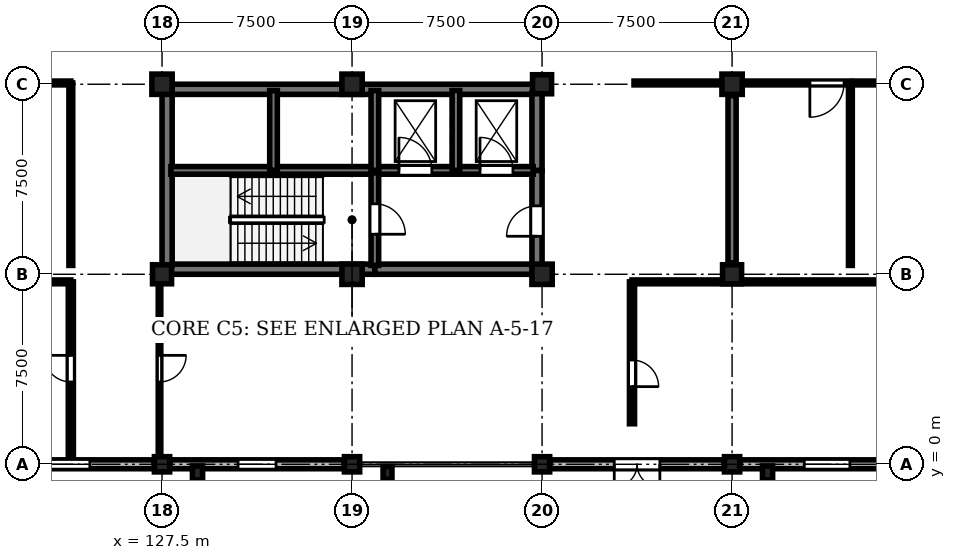
"""IFC4 building model, lengths in metres.
Left out: names, types, materials, properties, quantities, classifications, styles, units other than length and angle.
Written with IfcOpenShell. Run it as: python <this file> out.ifc"""

import sys

from ifc_helpers import new_model, si_unit, direction, frame, frame_2d, origin, origin_2d, place, context, subcontext, project, spatial, rectangle, circle, extrude, element, fill, save


model = new_model("IFC4")
c1 = context("Model", 3, precision=1e-05, world=origin(), true_north=direction((0.0, 1.0)))
c2 = subcontext(c1, "Body", "Model", "MODEL_VIEW")
j1 = project(units=[si_unit("LENGTHUNIT", "METRE"), si_unit("PLANEANGLEUNIT", "RADIAN")], contexts=[c1])
p1 = place(None, origin())
s1 = spatial("IfcSite", under=j1, at=p1, CompositionType="ELEMENT")
p2 = place(p1, origin())
s2 = spatial("IfcBuilding", under=s1, at=p2, CompositionType="ELEMENT")
p3 = place(p2, origin())
s3 = spatial("IfcBuildingStorey", under=s2, at=p3, CompositionType="ELEMENT", Elevation=0.0)
p4 = place(p3, frame((127.5, 0.0, 0.0), z_axis=(0.0, 0.0, 1.0), x_axis=(1.0, 0.0, 0.0)))
e1 = element("IfcColumn", 1, at=p4, inside=s3, PredefinedType="COLUMN", context=c2, shape_type="SweptSolid", body=[
    extrude(rectangle(XDim=0.6, YDim=0.6, at=origin_2d()), origin(), (0.0, 0.0, 1.0), 4.8),
])
p5 = place(p3, frame((127.5, 7.5, 0.0), z_axis=(0.0, 0.0, 1.0), x_axis=(1.0, 0.0, 0.0)))
e2 = element("IfcColumn", 2, at=p5, inside=s3, PredefinedType="COLUMN", context=c2, shape_type="SweptSolid", body=[
    extrude(circle(Radius=0.375, at=origin_2d()), origin(), (0.0, 0.0, 1.0), 4.8),
])
p6 = place(p3, frame((127.5, 15.0, 0.0), z_axis=(0.0, 0.0, 1.0), x_axis=(1.0, 0.0, 0.0)))
e3 = element("IfcColumn", 3, at=p6, inside=s3, PredefinedType="COLUMN", context=c2, shape_type="SweptSolid", body=[
    extrude(rectangle(XDim=0.8, YDim=0.8, at=origin_2d()), origin(), (0.0, 0.0, 1.0), 4.8),
])
p7 = place(p3, frame((135.0, 0.0, 0.0), z_axis=(0.0, 0.0, 1.0), x_axis=(1.0, 0.0, 0.0)))
e4 = element("IfcColumn", 4, at=p7, inside=s3, PredefinedType="COLUMN", context=c2, shape_type="SweptSolid", body=[
    extrude(circle(Radius=0.3, at=origin_2d()), origin(), (0.0, 0.0, 1.0), 4.8),
])
for number, where, z_axis, x_axis in (
    (5, (135.0, 7.5, 0.0), (0.0, 0.0, 1.0), (1.0, 0.0, 0.0)),
    (6, (135.0, 15.0, 0.0), (0.0, 0.0, 1.0), (1.0, 0.0, 0.0)),
):
    element("IfcColumn", number, at=place(p3, frame(where, z_axis=z_axis, x_axis=x_axis)), inside=s3, PredefinedType="COLUMN", context=c2, shape_type="SweptSolid", body=[
        extrude(rectangle(XDim=0.8, YDim=0.8, at=origin_2d()), origin(), (0.0, 0.0, 1.0), 4.8),
    ])
p8 = place(p3, frame((142.5, 0.0, 0.0), z_axis=(0.0, 0.0, 1.0), x_axis=(1.0, 0.0, 0.0)))
e7 = element("IfcColumn", 7, at=p8, inside=s3, PredefinedType="COLUMN", context=c2, shape_type="SweptSolid", body=[
    extrude(rectangle(XDim=0.6, YDim=0.6, at=origin_2d()), origin(), (0.0, 0.0, 1.0), 4.8),
])
p9 = place(p3, frame((142.5, 7.5, 0.0), z_axis=(0.0, 0.0, 1.0), x_axis=(1.0, 0.0, 0.0)))
e8 = element("IfcColumn", 8, at=p9, inside=s3, PredefinedType="COLUMN", context=c2, shape_type="SweptSolid", body=[
    extrude(rectangle(XDim=0.8, YDim=0.8, at=origin_2d()), origin(), (0.0, 0.0, 1.0), 4.8),
])
p10 = place(p3, frame((142.5, 15.0, 0.0), z_axis=(0.0, 0.0, 1.0), x_axis=(1.0, 0.0, 0.0)))
e9 = element("IfcColumn", 9, at=p10, inside=s3, PredefinedType="COLUMN", context=c2, shape_type="SweptSolid", body=[
    extrude(circle(Radius=0.375, at=origin_2d()), origin(), (0.0, 0.0, 1.0), 4.8),
])
p11 = place(p3, frame((150.0, 0.0, 0.0), z_axis=(0.0, 0.0, 1.0), x_axis=(1.0, 0.0, 0.0)))
e10 = element("IfcColumn", 10, at=p11, inside=s3, PredefinedType="COLUMN", context=c2, shape_type="SweptSolid", body=[
    extrude(rectangle(XDim=0.6, YDim=0.6, at=origin_2d()), origin(), (0.0, 0.0, 1.0), 4.8),
])
p12 = place(p3, frame((150.0, 7.5, 0.0), z_axis=(0.0, 0.0, 1.0), x_axis=(1.0, 0.0, 0.0)))
e11 = element("IfcColumn", 11, at=p12, inside=s3, PredefinedType="COLUMN", context=c2, shape_type="SweptSolid", body=[
    extrude(circle(Radius=0.375, at=origin_2d()), origin(), (0.0, 0.0, 1.0), 4.8),
])
p13 = place(p3, frame((150.0, 15.0, 0.0), z_axis=(0.0, 0.0, 1.0), x_axis=(1.0, 0.0, 0.0)))
e12 = element("IfcColumn", 12, at=p13, inside=s3, PredefinedType="COLUMN", context=c2, shape_type="SweptSolid", body=[
    extrude(rectangle(XDim=0.8, YDim=0.8, at=origin_2d()), origin(), (0.0, 0.0, 1.0), 4.8),
])
p14 = place(p3, frame((128.9, -0.34, 0.0), z_axis=(0.0, 0.0, 1.0), x_axis=(1.0, 0.0, 0.0)))
e13 = element("IfcColumn", 13, at=p14, inside=s3, PredefinedType="PILASTER", context=c2, shape_type="SweptSolid", body=[
    extrude(rectangle(XDim=0.4, YDim=0.55, at=origin_2d()), origin(), (0.0, 0.0, 1.0), 4.1),
])
p15 = place(p3, frame((136.4, -0.34, 0.0), z_axis=(0.0, 0.0, 1.0), x_axis=(1.0, 0.0, 0.0)))
e14 = element("IfcColumn", 14, at=p15, inside=s3, PredefinedType="PILASTER", context=c2, shape_type="SweptSolid", body=[
    extrude(rectangle(XDim=0.35, YDim=0.5, at=origin_2d()), origin(), (0.0, 0.0, 1.0), 4.1),
])
p16 = place(p3, frame((151.4, -0.34, 0.0), z_axis=(0.0, 0.0, 1.0), x_axis=(1.0, 0.0, 0.0)))
e15 = element("IfcColumn", 15, at=p16, inside=s3, PredefinedType="PILASTER", context=c2, shape_type="SweptSolid", body=[
    extrude(rectangle(XDim=0.4, YDim=0.55, at=origin_2d()), origin(), (0.0, 0.0, 1.0), 4.1),
])
p17 = place(p3, frame((150.0, 7.95, 0.0), z_axis=(0.0, 0.0, 1.0), x_axis=(0.0, 1.0, 0.0)))
e16 = element("IfcWall", 16, at=p17, inside=s3, PredefinedType="SHEAR", context=c2, shape_type="SweptSolid", body=[
    extrude(rectangle(XDim=6.6, YDim=0.32, at=frame_2d((3.3, 0.0))), origin(), (0.0, 0.0, 1.0), 3.95),
])
p18 = place(p3, frame((127.19, 0.0, 0.0), z_axis=(0.0, 0.0, 1.0), x_axis=(-1.0, 0.0, 0.0)))
e17 = element("IfcWall", 17, at=p18, inside=s3, PredefinedType="STANDARD", context=c2, shape_type="SweptSolid", body=[
    extrude(rectangle(XDim=6.88, YDim=0.35, at=frame_2d((3.44, 0.0))), origin(), (0.0, 0.0, 1.0), 3.95),
])
p19 = place(p18, frame((2.54, 0.0, 0.9)))
e18 = element("IfcOpeningElement", 18, at=p19, cuts=e17, PredefinedType="OPENING", context=c2, shape_type="SweptSolid", body=[
    extrude(rectangle(XDim=1.8, YDim=2.4, at=frame_2d((0.9, 1.2))), frame((0.0, 0.185, 0.0), z_axis=(0.0, -1.0, 0.0), x_axis=(1.0, 0.0, 0.0)), (0.0, 0.0, 1.0), 0.37),
])
p20 = place(p3, frame((134.69, 0.0, 0.0), z_axis=(0.0, 0.0, 1.0), x_axis=(-1.0, 0.0, 0.0)))
e19 = element("IfcWall", 19, at=p20, inside=s3, PredefinedType="STANDARD", context=c2, shape_type="SweptSolid", body=[
    extrude(rectangle(XDim=6.88, YDim=0.35, at=frame_2d((3.44, 0.0))), origin(), (0.0, 0.0, 1.0), 3.95),
])
p21 = place(p20, frame((2.69, 0.0, 0.9)))
e20 = element("IfcOpeningElement", 20, at=p21, cuts=e19, PredefinedType="OPENING", context=c2, shape_type="SweptSolid", body=[
    extrude(rectangle(XDim=1.5, YDim=2.4, at=frame_2d((0.75, 1.2))), frame((0.0, 0.185, 0.0), z_axis=(0.0, -1.0, 0.0), x_axis=(1.0, 0.0, 0.0)), (0.0, 0.0, 1.0), 0.37),
])
p22 = place(p3, frame((149.69, 0.0, 0.0), z_axis=(0.0, 0.0, 1.0), x_axis=(-1.0, 0.0, 0.0)))
e21 = element("IfcWall", 21, at=p22, inside=s3, PredefinedType="STANDARD", context=c2, shape_type="SweptSolid", body=[
    extrude(rectangle(XDim=6.88, YDim=0.35, at=frame_2d((3.44, 0.0))), origin(), (0.0, 0.0, 1.0), 3.95),
])
p23 = place(p22, frame((2.54, 0.0, 0.0)))
e22 = element("IfcOpeningElement", 22, at=p23, cuts=e21, PredefinedType="OPENING", context=c2, shape_type="SweptSolid", body=[
    extrude(rectangle(XDim=1.8, YDim=2.5, at=frame_2d((0.9, 1.25))), frame((0.0, 0.185, 0.0), z_axis=(0.0, -1.0, 0.0), x_axis=(1.0, 0.0, 0.0)), (0.0, 0.0, 1.0), 0.37),
])
p24 = place(p3, frame((157.19, 0.0, 0.0), z_axis=(0.0, 0.0, 1.0), x_axis=(-1.0, 0.0, 0.0)))
e23 = element("IfcWall", 23, at=p24, inside=s3, PredefinedType="STANDARD", context=c2, shape_type="SweptSolid", body=[
    extrude(rectangle(XDim=6.88, YDim=0.35, at=frame_2d((3.44, 0.0))), origin(), (0.0, 0.0, 1.0), 3.95),
])
p25 = place(p24, frame((2.54, 0.0, 0.9)))
e24 = element("IfcOpeningElement", 24, at=p25, cuts=e23, PredefinedType="OPENING", context=c2, shape_type="SweptSolid", body=[
    extrude(rectangle(XDim=1.8, YDim=2.1, at=frame_2d((0.9, 1.05))), frame((0.0, 0.185, 0.0), z_axis=(0.0, -1.0, 0.0), x_axis=(1.0, 0.0, 0.0)), (0.0, 0.0, 1.0), 0.37),
])
p26 = place(p3, frame((127.85, 7.7, 0.0), z_axis=(0.0, 0.0, 1.0), x_axis=(1.0, 0.0, 0.0)))
e25 = element("IfcWall", 25, at=p26, inside=s3, PredefinedType="SHEAR", context=c2, shape_type="SweptSolid", body=[
    extrude(rectangle(XDim=8.05, YDim=0.4, at=frame_2d((4.025, 0.0))), origin(), (0.0, 0.0, 1.0), 4.5),
])
p27 = place(p3, frame((135.9, 7.7, 0.0), z_axis=(0.0, 0.0, 1.0), x_axis=(1.0, 0.0, 0.0)))
e26 = element("IfcWall", 26, at=p27, inside=s3, PredefinedType="SHEAR", context=c2, shape_type="SweptSolid", body=[
    extrude(rectangle(XDim=6.25, YDim=0.4, at=frame_2d((3.125, 0.0))), origin(), (0.0, 0.0, 1.0), 4.5),
])
p28 = place(p3, frame((127.85, 14.8, 0.0), z_axis=(0.0, 0.0, 1.0), x_axis=(1.0, 0.0, 0.0)))
e27 = element("IfcWall", 27, at=p28, inside=s3, PredefinedType="SHEAR", context=c2, shape_type="SweptSolid", body=[
    extrude(rectangle(XDim=14.3, YDim=0.4, at=frame_2d((7.15, 0.0))), origin(), (0.0, 0.0, 1.0), 4.5),
])
p29 = place(p3, frame((127.7, 7.85, 0.0), z_axis=(0.0, 0.0, 1.0), x_axis=(0.0, 1.0, 0.0)))
e28 = element("IfcWall", 28, at=p29, inside=s3, PredefinedType="SHEAR", context=c2, shape_type="SweptSolid", body=[
    extrude(rectangle(XDim=6.8, YDim=0.4, at=frame_2d((3.4, 0.0))), origin(), (0.0, 0.0, 1.0), 4.5),
])
p30 = place(p3, frame((142.3, 7.85, 0.0), z_axis=(0.0, 0.0, 1.0), x_axis=(0.0, 1.0, 0.0)))
e29 = element("IfcWall", 29, at=p30, inside=s3, PredefinedType="SHEAR", context=c2, shape_type="SweptSolid", body=[
    extrude(rectangle(XDim=3.75, YDim=0.4, at=frame_2d((1.875, 0.0))), origin(), (0.0, 0.0, 1.0), 4.5),
])
p31 = place(p30, frame((1.15, 0.0, 0.0)))
e30 = element("IfcOpeningElement", 30, at=p31, cuts=e29, PredefinedType="OPENING", context=c2, shape_type="SweptSolid", body=[
    extrude(rectangle(XDim=1.2, YDim=2.25, at=frame_2d((0.6, 1.125))), frame((0.0, 0.21, 0.0), z_axis=(0.0, -1.0, 0.0), x_axis=(1.0, 0.0, 0.0)), (0.0, 0.0, 1.0), 0.42),
])
p32 = place(p3, frame((142.3, 11.6, 0.0), z_axis=(0.0, 0.0, 1.0), x_axis=(0.0, 1.0, 0.0)))
e31 = element("IfcWall", 31, at=p32, inside=s3, PredefinedType="SHEAR", context=c2, shape_type="SweptSolid", body=[
    extrude(rectangle(XDim=3.05, YDim=0.4, at=frame_2d((1.525, 0.0))), origin(), (0.0, 0.0, 1.0), 4.5),
])
p33 = place(p3, frame((127.85, 11.6, 0.0), z_axis=(0.0, 0.0, 1.0), x_axis=(1.0, 0.0, 0.0)))
e32 = element("IfcWall", 32, at=p33, inside=s3, PredefinedType="SHEAR", context=c2, shape_type="SweptSolid", body=[
    extrude(rectangle(XDim=8.05, YDim=0.3, at=frame_2d((4.025, 0.0))), origin(), (0.0, 0.0, 1.0), 4.5),
])
p34 = place(p3, frame((135.9, 11.6, 0.0), z_axis=(0.0, 0.0, 1.0), x_axis=(1.0, 0.0, 0.0)))
e33 = element("IfcWall", 33, at=p34, inside=s3, PredefinedType="SHEAR", context=c2, shape_type="SweptSolid", body=[
    extrude(rectangle(XDim=6.25, YDim=0.3, at=frame_2d((3.125, 0.0))), origin(), (0.0, 0.0, 1.0), 4.5),
])
p35 = place(p34, frame((0.95, 0.0, 0.0)))
e34 = element("IfcOpeningElement", 34, at=p35, cuts=e33, PredefinedType="OPENING", context=c2, shape_type="SweptSolid", body=[
    extrude(rectangle(XDim=1.3, YDim=2.2, at=frame_2d((0.65, 1.1))), frame((0.0, 0.16, 0.0), z_axis=(0.0, -1.0, 0.0), x_axis=(1.0, 0.0, 0.0)), (0.0, 0.0, 1.0), 0.32),
])
p36 = place(p34, frame((4.15, 0.0, 0.0)))
e35 = element("IfcOpeningElement", 35, at=p36, cuts=e33, PredefinedType="OPENING", context=c2, shape_type="SweptSolid", body=[
    extrude(rectangle(XDim=1.3, YDim=2.2, at=frame_2d((0.65, 1.1))), frame((0.0, 0.16, 0.0), z_axis=(0.0, -1.0, 0.0), x_axis=(1.0, 0.0, 0.0)), (0.0, 0.0, 1.0), 0.32),
])
p37 = place(p3, frame((135.9, 11.5, 0.0), z_axis=(0.0, 0.0, 1.0), x_axis=(0.0, -1.0, 0.0)))
e36 = element("IfcWall", 36, at=p37, inside=s3, PredefinedType="SHEAR", context=c2, shape_type="SweptSolid", body=[
    extrude(rectangle(XDim=3.65, YDim=0.3, at=frame_2d((1.825, 0.0))), origin(), (0.0, 0.0, 1.0), 4.5),
])
p38 = place(p37, frame((1.22, 0.0, 0.0)))
e37 = element("IfcOpeningElement", 37, at=p38, cuts=e36, PredefinedType="OPENING", context=c2, shape_type="SweptSolid", body=[
    extrude(rectangle(XDim=1.2, YDim=2.25, at=frame_2d((0.6, 1.125))), frame((0.0, 0.16, 0.0), z_axis=(0.0, -1.0, 0.0), x_axis=(1.0, 0.0, 0.0)), (0.0, 0.0, 1.0), 0.32),
])
for number, where, z_axis, x_axis in (
    (38, (131.9, 11.6, 0.0), (0.0, 0.0, 1.0), (0.0, 1.0, 0.0)),
    (39, (135.9, 11.6, 0.0), (0.0, 0.0, 1.0), (0.0, 1.0, 0.0)),
    (40, (139.1, 11.6, 0.0), (0.0, 0.0, 1.0), (0.0, 1.0, 0.0)),
):
    element("IfcWall", number, at=place(p3, frame(where, z_axis=z_axis, x_axis=x_axis)), inside=s3, PredefinedType="SHEAR", context=c2, shape_type="SweptSolid", body=[
        extrude(rectangle(XDim=3.15, YDim=0.3, at=frame_2d((1.575, 0.0))), origin(), (0.0, 0.0, 1.0), 4.5),
    ])
p39 = place(p3, frame((123.9, 0.35, 0.0), z_axis=(0.0, 0.0, 1.0), x_axis=(0.0, 1.0, 0.0)))
e41 = element("IfcWall", 41, at=p39, inside=s3, PredefinedType="STANDARD", context=c2, shape_type="SweptSolid", body=[
    extrude(rectangle(XDim=6.85, YDim=0.2, at=frame_2d((3.425, 0.0))), origin(), (0.0, 0.0, 1.0), 4.485),
])
p40 = place(p39, frame((2.9, 0.0, 0.0)))
e42 = element("IfcOpeningElement", 42, at=p40, cuts=e41, PredefinedType="OPENING", context=c2, shape_type="SweptSolid", body=[
    extrude(rectangle(XDim=1.05, YDim=2.2, at=frame_2d((0.525, 1.1))), frame((0.0, 0.11, 0.0), z_axis=(0.0, -1.0, 0.0), x_axis=(1.0, 0.0, 0.0)), (0.0, 0.0, 1.0), 0.22),
])
p41 = place(p3, frame((127.4, 7.2, 0.0), z_axis=(0.0, 0.0, 1.0), x_axis=(0.0, -1.0, 0.0)))
e43 = element("IfcWall", 43, at=p41, inside=s3, PredefinedType="PARTITIONING", context=c2, shape_type="SweptSolid", body=[
    extrude(rectangle(XDim=6.85, YDim=0.1, at=frame_2d((3.425, 0.0))), origin(), (0.0, 0.0, 1.0), 3.985),
])
p42 = place(p41, frame((2.9, 0.0, 0.0)))
e44 = element("IfcOpeningElement", 44, at=p42, cuts=e43, PredefinedType="OPENING", context=c2, shape_type="SweptSolid", body=[
    extrude(rectangle(XDim=1.05, YDim=2.2, at=frame_2d((0.525, 1.1))), frame((0.0, 0.06, 0.0), z_axis=(0.0, -1.0, 0.0), x_axis=(1.0, 0.0, 0.0)), (0.0, 0.0, 1.0), 0.12),
])
p43 = place(p3, frame((146.05, 7.2, 0.0), z_axis=(0.0, 0.0, 1.0), x_axis=(0.0, -1.0, 0.0)))
e45 = element("IfcWall", 45, at=p43, inside=s3, PredefinedType="STANDARD", context=c2, shape_type="SweptSolid", body=[
    extrude(rectangle(XDim=5.6, YDim=0.2, at=frame_2d((2.8, 0.0))), origin(), (0.0, 0.0, 1.0), 4.485),
])
p44 = place(p43, frame((3.085, 0.0, 0.0)))
e46 = element("IfcOpeningElement", 46, at=p44, cuts=e45, PredefinedType="OPENING", context=c2, shape_type="SweptSolid", body=[
    extrude(rectangle(XDim=1.05, YDim=2.2, at=frame_2d((0.525, 1.1))), frame((0.0, 0.11, 0.0), z_axis=(0.0, -1.0, 0.0), x_axis=(1.0, 0.0, 0.0)), (0.0, 0.0, 1.0), 0.22),
])
p45 = place(p3, frame((123.9, 15.05, 0.0), z_axis=(0.0, 0.0, 1.0), x_axis=(-1.0, 0.0, 0.0)))
e47 = element("IfcWall", 47, at=p45, inside=s3, PredefinedType="PARTITIONING", context=c2, shape_type="SweptSolid", body=[
    extrude(rectangle(XDim=11.05, YDim=0.15, at=frame_2d((5.525, 0.0))), origin(), (0.0, 0.0, 1.0), 3.835),
])
p46 = place(p45, frame((6.76, 0.0, 0.0)))
e48 = element("IfcOpeningElement", 48, at=p46, cuts=e47, PredefinedType="OPENING", context=c2, shape_type="SweptSolid", body=[
    extrude(rectangle(XDim=1.25, YDim=2.2, at=frame_2d((0.625, 1.1))), frame((0.0, 0.085, 0.0), z_axis=(0.0, -1.0, 0.0), x_axis=(1.0, 0.0, 0.0)), (0.0, 0.0, 1.0), 0.17),
])
p47 = place(p3, frame((154.67, 15.05, 0.0), z_axis=(0.0, 0.0, 1.0), x_axis=(-1.0, 0.0, 0.0)))
e49 = element("IfcWall", 49, at=p47, inside=s3, PredefinedType="PARTITIONING", context=c2, shape_type="SweptSolid", body=[
    extrude(rectangle(XDim=8.54, YDim=0.15, at=frame_2d((4.27, 0.0))), origin(), (0.0, 0.0, 1.0), 3.835),
])
p48 = place(p47, frame((0.25, 0.0, 0.0)))
e50 = element("IfcOpeningElement", 50, at=p48, cuts=e49, PredefinedType="OPENING", context=c2, shape_type="SweptSolid", body=[
    extrude(rectangle(XDim=1.35, YDim=2.25, at=frame_2d((0.675, 1.125))), frame((0.0, 0.085, 0.0), z_axis=(0.0, -1.0, 0.0), x_axis=(1.0, 0.0, 0.0)), (0.0, 0.0, 1.0), 0.17),
])
p49 = place(p3, frame((163.37, 15.05, 0.0), z_axis=(0.0, 0.0, 1.0), x_axis=(-1.0, 0.0, 0.0)))
e51 = element("IfcWall", 51, at=p49, inside=s3, PredefinedType="PARTITIONING", context=c2, shape_type="SweptSolid", body=[
    extrude(rectangle(XDim=8.54, YDim=0.15, at=frame_2d((4.27, 0.0))), origin(), (0.0, 0.0, 1.0), 3.835),
])
p50 = place(p49, frame((1.588, 0.0, 0.0)))
e52 = element("IfcOpeningElement", 52, at=p50, cuts=e51, PredefinedType="OPENING", context=c2, shape_type="SweptSolid", body=[
    extrude(rectangle(XDim=1.35, YDim=2.25, at=frame_2d((0.675, 1.125))), frame((0.0, 0.085, 0.0), z_axis=(0.0, -1.0, 0.0), x_axis=(1.0, 0.0, 0.0)), (0.0, 0.0, 1.0), 0.17),
])
p51 = place(p3, frame((112.85, 7.2, 0.0), z_axis=(0.0, 0.0, 1.0), x_axis=(1.0, 0.0, 0.0)))
e53 = element("IfcWall", 53, at=p51, inside=s3, PredefinedType="PARTITIONING", context=c2, shape_type="SweptSolid", body=[
    extrude(rectangle(XDim=11.05, YDim=0.15, at=frame_2d((5.525, 0.0))), origin(), (0.0, 0.0, 1.0), 3.835),
])
p52 = place(p3, frame((146.05, 7.2, 0.0), z_axis=(0.0, 0.0, 1.0), x_axis=(1.0, 0.0, 0.0)))
e54 = element("IfcWall", 54, at=p52, inside=s3, PredefinedType="PARTITIONING", context=c2, shape_type="SweptSolid", body=[
    extrude(rectangle(XDim=26.1, YDim=0.15, at=frame_2d((13.05, 0.0))), origin(), (0.0, 0.0, 1.0), 3.835),
])
for number, where, z_axis, x_axis in (
    (55, (123.9, 7.85, 0.0), (0.0, 0.0, 1.0), (0.0, 1.0, 0.0)),
    (56, (154.67, 7.85, 0.0), (0.0, 0.0, 1.0), (0.0, 1.0, 0.0)),
):
    element("IfcWall", number, at=place(p3, frame(where, z_axis=z_axis, x_axis=x_axis)), inside=s3, PredefinedType="PARTITIONING", context=c2, shape_type="SweptSolid", body=[
        extrude(rectangle(XDim=7.2, YDim=0.15, at=frame_2d((3.6, 0.0))), origin(), (0.0, 0.0, 1.0), 4.485),
    ])
p53 = place(p19, origin())
e57 = element("IfcWindow", 57, at=p53, inside=s3, PartitioningType="SINGLE_PANEL", PredefinedType="WINDOW", context=c2, shape_type="SweptSolid", body=[
    extrude(rectangle(XDim=1.8, YDim=2.4, at=frame_2d((0.9, 1.2))), frame((0.0, 0.03, 0.0), z_axis=(0.0, -1.0, 0.0), x_axis=(1.0, 0.0, 0.0)), (0.0, 0.0, 1.0), 0.06),
])
fill(e18, e57)
p54 = place(p21, origin())
e58 = element("IfcWindow", 58, at=p54, inside=s3, PartitioningType="SINGLE_PANEL", PredefinedType="WINDOW", context=c2, shape_type="SweptSolid", body=[
    extrude(rectangle(XDim=1.5, YDim=2.4, at=frame_2d((0.75, 1.2))), frame((0.0, 0.03, 0.0), z_axis=(0.0, -1.0, 0.0), x_axis=(1.0, 0.0, 0.0)), (0.0, 0.0, 1.0), 0.06),
])
fill(e20, e58)
p55 = place(p23, origin())
e59 = element("IfcDoor", 59, at=p55, inside=s3, OperationType="DOUBLE_DOOR_SINGLE_SWING", PredefinedType="DOOR", context=c2, shape_type="SweptSolid", body=[
    extrude(rectangle(XDim=1.8, YDim=2.5, at=frame_2d((0.9, 1.25))), frame((0.0, 0.025, 0.0), z_axis=(0.0, -1.0, 0.0), x_axis=(1.0, 0.0, 0.0)), (0.0, 0.0, 1.0), 0.05),
])
fill(e22, e59)
p56 = place(p25, origin())
e60 = element("IfcWindow", 60, at=p56, inside=s3, PartitioningType="SINGLE_PANEL", PredefinedType="WINDOW", context=c2, shape_type="SweptSolid", body=[
    extrude(rectangle(XDim=1.8, YDim=2.1, at=frame_2d((0.9, 1.05))), frame((0.0, 0.03, 0.0), z_axis=(0.0, -1.0, 0.0), x_axis=(1.0, 0.0, 0.0)), (0.0, 0.0, 1.0), 0.06),
])
fill(e24, e60)
p57 = place(p31, origin())
e61 = element("IfcDoor", 61, at=p57, inside=s3, OperationType="SINGLE_SWING_LEFT", PredefinedType="DOOR", context=c2, shape_type="SweptSolid", body=[
    extrude(rectangle(XDim=1.2, YDim=2.25, at=frame_2d((0.6, 1.125))), frame((0.0, 0.025, 0.0), z_axis=(0.0, -1.0, 0.0), x_axis=(1.0, 0.0, 0.0)), (0.0, 0.0, 1.0), 0.05),
])
fill(e30, e61)
p58 = place(p35, origin())
e62 = element("IfcDoor", 62, at=p58, inside=s3, OperationType="DOUBLE_DOOR_SLIDING", PredefinedType="DOOR", context=c2, shape_type="SweptSolid", body=[
    extrude(rectangle(XDim=1.3, YDim=2.2, at=frame_2d((0.65, 1.1))), frame((0.0, 0.025, 0.0), z_axis=(0.0, -1.0, 0.0), x_axis=(1.0, 0.0, 0.0)), (0.0, 0.0, 1.0), 0.05),
])
fill(e34, e62)
p59 = place(p36, origin())
e63 = element("IfcDoor", 63, at=p59, inside=s3, OperationType="DOUBLE_DOOR_SLIDING", PredefinedType="DOOR", context=c2, shape_type="SweptSolid", body=[
    extrude(rectangle(XDim=1.3, YDim=2.2, at=frame_2d((0.65, 1.1))), frame((0.0, 0.025, 0.0), z_axis=(0.0, -1.0, 0.0), x_axis=(1.0, 0.0, 0.0)), (0.0, 0.0, 1.0), 0.05),
])
fill(e35, e63)
p60 = place(p38, origin())
e64 = element("IfcDoor", 64, at=p60, inside=s3, OperationType="SINGLE_SWING_RIGHT", PredefinedType="DOOR", context=c2, shape_type="SweptSolid", body=[
    extrude(rectangle(XDim=1.2, YDim=2.25, at=frame_2d((0.6, 1.125))), frame((0.0, 0.025, 0.0), z_axis=(0.0, -1.0, 0.0), x_axis=(1.0, 0.0, 0.0)), (0.0, 0.0, 1.0), 0.05),
])
fill(e37, e64)
p61 = place(p40, origin())
e65 = element("IfcDoor", 65, at=p61, inside=s3, OperationType="SINGLE_SWING_RIGHT", PredefinedType="DOOR", context=c2, shape_type="SweptSolid", body=[
    extrude(rectangle(XDim=1.05, YDim=2.2, at=frame_2d((0.525, 1.1))), frame((0.0, 0.025, 0.0), z_axis=(0.0, -1.0, 0.0), x_axis=(1.0, 0.0, 0.0)), (0.0, 0.0, 1.0), 0.05),
])
fill(e42, e65)
p62 = place(p42, origin())
e66 = element("IfcDoor", 66, at=p62, inside=s3, OperationType="SINGLE_SWING_LEFT", PredefinedType="DOOR", context=c2, shape_type="SweptSolid", body=[
    extrude(rectangle(XDim=1.05, YDim=2.2, at=frame_2d((0.525, 1.1))), frame((0.0, 0.025, 0.0), z_axis=(0.0, -1.0, 0.0), x_axis=(1.0, 0.0, 0.0)), (0.0, 0.0, 1.0), 0.05),
])
fill(e44, e66)
p63 = place(p44, origin())
e67 = element("IfcDoor", 67, at=p63, inside=s3, OperationType="SINGLE_SWING_RIGHT", PredefinedType="DOOR", context=c2, shape_type="SweptSolid", body=[
    extrude(rectangle(XDim=1.05, YDim=2.2, at=frame_2d((0.525, 1.1))), frame((0.0, 0.025, 0.0), z_axis=(0.0, -1.0, 0.0), x_axis=(1.0, 0.0, 0.0)), (0.0, 0.0, 1.0), 0.05),
])
fill(e46, e67)
p64 = place(p48, origin())
e68 = element("IfcDoor", 68, at=p64, inside=s3, OperationType="SINGLE_SWING_RIGHT", PredefinedType="DOOR", context=c2, shape_type="SweptSolid", body=[
    extrude(rectangle(XDim=1.35, YDim=2.25, at=frame_2d((0.675, 1.125))), frame((0.0, 0.025, 0.0), z_axis=(0.0, -1.0, 0.0), x_axis=(1.0, 0.0, 0.0)), (0.0, 0.0, 1.0), 0.05),
])
fill(e50, e68)
save(model, sys.argv[1])
